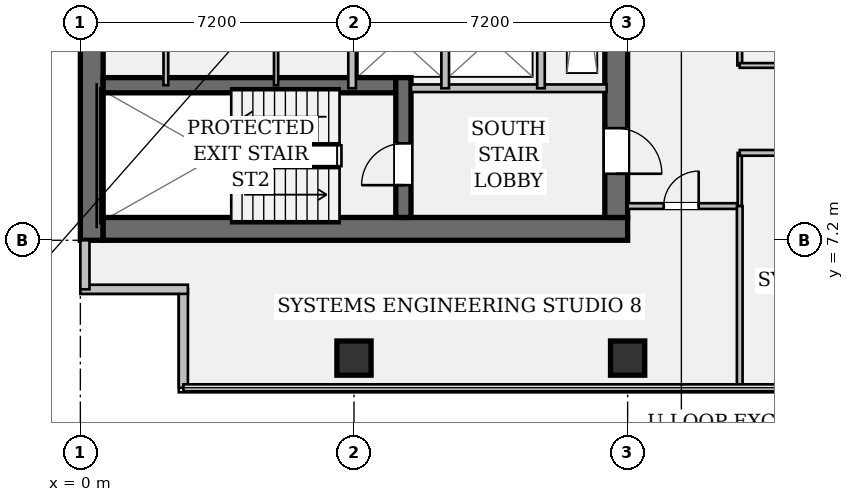
"""IFC4 building model, lengths in metres.
Left out: names, types, materials, properties, quantities, classifications, styles, units other than length and angle.
Written with IfcOpenShell. Run it as: python <this file> out.ifc"""

import sys

from ifc_helpers import new_model, si_unit, direction, frame, frame_2d, origin, origin_2d, place, context, subcontext, project, spatial, rectangle, hollow_rectangle, extrude, element, fill, save


model = new_model("IFC4")
c1 = context("Model", 3, precision=1e-05, world=origin(), true_north=direction((0.0, 1.0)))
c2 = subcontext(c1, "Body", "Model", "MODEL_VIEW")
j1 = project(units=[si_unit("LENGTHUNIT", "METRE"), si_unit("PLANEANGLEUNIT", "RADIAN")], contexts=[c1])
p1 = place(None, origin())
s1 = spatial("IfcSite", under=j1, at=p1, CompositionType="ELEMENT")
p2 = place(p1, origin())
s2 = spatial("IfcBuilding", under=s1, at=p2, CompositionType="ELEMENT")
p3 = place(p2, frame((0.0, 0.0, 140.7)))
s3 = spatial("IfcBuildingStorey", under=s2, at=p3, CompositionType="ELEMENT", Elevation=140.7)
p4 = place(p3, frame((0.3, 7.2, 0.0), z_axis=(0.0, 0.0, 1.0), x_axis=(0.0, 1.0, 0.0)))
e1 = element("IfcWall", 1, at=p4, inside=s3, PredefinedType="SHEAR", context=c2, shape_type="SweptSolid", body=[
    extrude(rectangle(XDim=28.8, YDim=0.6, at=frame_2d((14.4, 0.0))), origin(), (0.0, 0.0, 1.0), 3.58),
])
p5 = place(p3, frame((0.6, 7.5, 0.0), z_axis=(0.0, 0.0, 1.0), x_axis=(1.0, 0.0, 0.0)))
e2 = element("IfcWall", 2, at=p5, inside=s3, PredefinedType="SHEAR", context=c2, shape_type="SweptSolid", body=[
    extrude(rectangle(XDim=13.8, YDim=0.6, at=frame_2d((6.9, 0.0))), origin(), (0.0, 0.0, 1.0), 3.58),
])
p6 = place(p3, frame((14.1, 35.4, 0.0), z_axis=(0.0, 0.0, 1.0), x_axis=(0.0, -1.0, 0.0)))
e3 = element("IfcWall", 3, at=p6, inside=s3, PredefinedType="SHEAR", context=c2, shape_type="SweptSolid", body=[
    extrude(rectangle(XDim=27.6, YDim=0.6, at=frame_2d((13.8, 0.0))), origin(), (0.0, 0.0, 1.0), 3.58),
])
p7 = place(p6, frame((1.3, 0.0, 0.0)))
e4 = element("IfcOpeningElement", 4, at=p7, cuts=e3, PredefinedType="OPENING", context=c2, shape_type="SweptSolid", body=[
    extrude(rectangle(XDim=1.2, YDim=2.15, at=frame_2d((0.6, 1.075))), frame((0.0, 0.312, 0.0), z_axis=(0.0, -1.0, 0.0), x_axis=(1.0, 0.0, 0.0)), (0.0, 0.0, 1.0), 0.624),
])
p8 = place(p6, frame((25.25, 0.0, 0.0)))
e5 = element("IfcOpeningElement", 5, at=p8, cuts=e3, PredefinedType="OPENING", context=c2, shape_type="SweptSolid", body=[
    extrude(rectangle(XDim=1.2, YDim=2.15, at=frame_2d((0.6, 1.075))), frame((0.0, 0.312, 0.0), z_axis=(0.0, -1.0, 0.0), x_axis=(1.0, 0.0, 0.0)), (0.0, 0.0, 1.0), 0.624),
])
p9 = place(p6, frame((14.6, 0.0, 0.0)))
e6 = element("IfcOpeningElement", 6, at=p9, cuts=e3, PredefinedType="OPENING", context=c2, shape_type="SweptSolid", body=[
    extrude(rectangle(XDim=1.6, YDim=2.2, at=frame_2d((0.8, 1.1))), frame((0.0, 0.312, 0.0), z_axis=(0.0, -1.0, 0.0), x_axis=(1.0, 0.0, 0.0)), (0.0, 0.0, 1.0), 0.624),
])
p10 = place(p3, frame((0.6, 11.28, 0.0), z_axis=(0.0, 0.0, 1.0), x_axis=(1.0, 0.0, 0.0)))
e7 = element("IfcWall", 7, at=p10, inside=s3, PredefinedType="SHEAR", context=c2, shape_type="SweptSolid", body=[
    extrude(rectangle(XDim=7.7, YDim=0.4, at=frame_2d((3.85, 0.0))), origin(), (0.0, 0.0, 1.0), 3.58),
])
p11 = place(p3, frame((8.5, 7.8, 0.0), z_axis=(0.0, 0.0, 1.0), x_axis=(0.0, 1.0, 0.0)))
e8 = element("IfcWall", 8, at=p11, inside=s3, PredefinedType="SHEAR", context=c2, shape_type="SweptSolid", body=[
    extrude(rectangle(XDim=3.68, YDim=0.4, at=frame_2d((1.84, 0.0))), origin(), (0.0, 0.0, 1.0), 3.58),
])
p12 = place(p11, frame((0.85, 0.0, 0.0)))
e9 = element("IfcOpeningElement", 9, at=p12, cuts=e8, PredefinedType="OPENING", context=c2, shape_type="SweptSolid", body=[
    extrude(rectangle(XDim=1.1, YDim=2.15, at=frame_2d((0.55, 1.075))), frame((0.0, 0.212, 0.0), z_axis=(0.0, -1.0, 0.0), x_axis=(1.0, 0.0, 0.0)), (0.0, 0.0, 1.0), 0.424),
])
for number, where, z_axis, x_axis in (
    (10, (7.2, 4.1, 0.0), (0.0, 0.0, 1.0), (1.0, 0.0, 0.0)),
    (11, (14.4, 4.1, 0.0), (0.0, 0.0, 1.0), (1.0, 0.0, 0.0)),
):
    element("IfcColumn", number, at=place(p3, frame(where, z_axis=z_axis, x_axis=x_axis)), inside=s3, PredefinedType="COLUMN", context=c2, shape_type="SweptSolid", body=[
        extrude(hollow_rectangle(XDim=0.9, YDim=0.9, WallThickness=0.055, at=origin_2d()), origin(), (0.0, 0.0, 1.0), 3.58),
    ])
p13 = place(p3, frame((2.71, 3.32, 0.0), z_axis=(0.0, 0.0, 1.0), x_axis=(0.0, 1.0, 0.0)))
e12 = element("IfcWall", 12, at=p13, inside=s3, PredefinedType="STANDARD", context=c2, shape_type="SweptSolid", body=[
    extrude(rectangle(XDim=2.59, YDim=0.24, at=frame_2d((1.295, 0.0))), origin(), (0.0, 0.0, 1.0), 3.58),
])
p14 = place(p3, frame((2.83, 5.91, 0.0), z_axis=(0.0, 0.0, 1.0), x_axis=(-1.0, 0.0, 0.0)))
e13 = element("IfcWall", 13, at=p14, inside=s3, PredefinedType="STANDARD", context=c2, shape_type="SweptSolid", body=[
    extrude(rectangle(XDim=2.83, YDim=0.24, at=frame_2d((1.415, 0.0))), origin(), (0.0, 0.0, 1.0), 3.58),
])
p15 = place(p3, frame((0.12, 5.91, 0.0), z_axis=(0.0, 0.0, 1.0), x_axis=(0.0, 1.0, 0.0)))
e14 = element("IfcWall", 14, at=p15, inside=s3, PredefinedType="STANDARD", context=c2, shape_type="SweptSolid", body=[
    extrude(rectangle(XDim=1.29, YDim=0.24, at=frame_2d((0.645, 0.0))), origin(), (0.0, 0.0, 1.0), 3.58),
])
p16 = place(p3, frame((8.7, 11.2, 0.0), z_axis=(0.0, 0.0, 1.0), x_axis=(1.0, 0.0, 0.0)))
e15 = element("IfcWall", 15, at=p16, inside=s3, PredefinedType="PARTITIONING", context=c2, shape_type="SweptSolid", body=[
    extrude(rectangle(XDim=5.15, YDim=0.2, at=frame_2d((2.575, 0.0))), origin(), (0.0, 0.0, 1.0), 3.58),
])
for number, where, z_axis, x_axis in (
    (16, (7.15, 11.2, 0.0), (0.0, 0.0, 1.0), (0.0, 1.0, 0.0)),
    (17, (9.6, 11.2, 0.0), (0.0, 0.0, 1.0), (0.0, 1.0, 0.0)),
):
    element("IfcWall", number, at=place(p3, frame(where, z_axis=z_axis, x_axis=x_axis)), inside=s3, PredefinedType="PARTITIONING", context=c2, shape_type="SweptSolid", body=[
        extrude(rectangle(XDim=2.4, YDim=0.2, at=frame_2d((1.2, 0.0))), origin(), (0.0, 0.0, 1.0), 3.58),
    ])
p17 = place(p3, frame((12.12, 11.2, 0.0), z_axis=(0.0, 0.0, 1.0), x_axis=(0.0, 1.0, 0.0)))
e18 = element("IfcWall", 18, at=p17, inside=s3, PredefinedType="PARTITIONING", context=c2, shape_type="SweptSolid", body=[
    extrude(rectangle(XDim=6.6, YDim=0.2, at=frame_2d((3.3, 0.0))), origin(), (0.0, 0.0, 1.0), 3.58),
])
p18 = place(p17, frame((2.95, 0.0, 0.0)))
e19 = element("IfcOpeningElement", 19, at=p18, cuts=e18, PredefinedType="OPENING", context=c2, shape_type="SweptSolid", body=[
    extrude(rectangle(XDim=0.85, YDim=2.15, at=frame_2d((0.425, 1.075))), frame((0.0, 0.112, 0.0), z_axis=(0.0, -1.0, 0.0), x_axis=(1.0, 0.0, 0.0)), (0.0, 0.0, 1.0), 0.224),
])
p19 = place(p3, frame((5.15, 11.28, 0.0), z_axis=(0.0, 0.0, 1.0), x_axis=(0.0, 1.0, 0.0)))
e20 = element("IfcWall", 20, at=p19, inside=s3, PredefinedType="PARTITIONING", context=c2, shape_type="SweptSolid", body=[
    extrude(rectangle(XDim=4.42, YDim=0.11, at=frame_2d((2.21, 0.0))), origin(), (0.0, 0.0, 1.0), 3.58),
])
p20 = place(p3, frame((2.25, 11.28, 0.0), z_axis=(0.0, 0.0, 1.0), x_axis=(0.0, 1.0, 0.0)))
e21 = element("IfcWall", 21, at=p20, inside=s3, PredefinedType="PARTITIONING", context=c2, shape_type="SweptSolid", body=[
    extrude(rectangle(XDim=4.42, YDim=0.125, at=frame_2d((2.21, 0.0))), origin(), (0.0, 0.0, 1.0), 3.58),
])
p21 = place(p20, frame((1.65, 0.0, 0.0)))
e22 = element("IfcOpeningElement", 22, at=p21, cuts=e21, PredefinedType="OPENING", context=c2, shape_type="SweptSolid", body=[
    extrude(rectangle(XDim=0.85, YDim=2.15, at=frame_2d((0.425, 1.075))), frame((0.0, 0.074, 0.0), z_axis=(0.0, -1.0, 0.0), x_axis=(1.0, 0.0, 0.0)), (0.0, 0.0, 1.0), 0.149),
])
p22 = place(p3, frame((14.4, 8.1, 0.0), z_axis=(0.0, 0.0, 1.0), x_axis=(1.0, 0.0, 0.0)))
e23 = element("IfcWall", 23, at=p22, inside=s3, PredefinedType="PARTITIONING", context=c2, shape_type="SweptSolid", body=[
    extrude(rectangle(XDim=2.95, YDim=0.15, at=frame_2d((1.475, 0.0))), origin(), (0.0, 0.0, 1.0), 3.148),
])
p23 = place(p22, frame((0.95, 0.0, 0.0)))
e24 = element("IfcOpeningElement", 24, at=p23, cuts=e23, PredefinedType="OPENING", context=c2, shape_type="SweptSolid", body=[
    extrude(rectangle(XDim=0.92, YDim=2.15, at=frame_2d((0.46, 1.075))), frame((0.0, 0.087, 0.0), z_axis=(0.0, -1.0, 0.0), x_axis=(1.0, 0.0, 0.0)), (0.0, 0.0, 1.0), 0.174),
])
p24 = place(p3, frame((17.35, 8.1, 0.0), z_axis=(0.0, 0.0, 1.0), x_axis=(0.0, 1.0, 0.0)))
e25 = element("IfcWall", 25, at=p24, inside=s3, PredefinedType="PARTITIONING", context=c2, shape_type="SweptSolid", body=[
    extrude(rectangle(XDim=1.4, YDim=0.11, at=frame_2d((0.7, 0.0))), origin(), (0.0, 0.0, 1.0), 3.58),
])
p25 = place(p3, frame((17.35, 9.5, 0.0), z_axis=(0.0, 0.0, 1.0), x_axis=(1.0, 0.0, 0.0)))
e26 = element("IfcWall", 26, at=p25, inside=s3, PredefinedType="PARTITIONING", context=c2, shape_type="SweptSolid", body=[
    extrude(rectangle(XDim=15.75, YDim=0.15, at=frame_2d((7.875, 0.0))), origin(), (0.0, 0.0, 1.0), 2.869),
])
p26 = place(p25, frame((3.73, 0.0, 0.0)))
e27 = element("IfcOpeningElement", 27, at=p26, cuts=e26, PredefinedType="OPENING", context=c2, shape_type="SweptSolid", body=[
    extrude(rectangle(XDim=0.92, YDim=2.15, at=frame_2d((0.46, 1.075))), frame((0.0, 0.087, 0.0), z_axis=(0.0, -1.0, 0.0), x_axis=(1.0, 0.0, 0.0)), (0.0, 0.0, 1.0), 0.174),
])
p27 = place(p25, frame((11.6, 0.0, 0.0)))
e28 = element("IfcOpeningElement", 28, at=p27, cuts=e26, PredefinedType="OPENING", context=c2, shape_type="SweptSolid", body=[
    extrude(rectangle(XDim=0.92, YDim=2.15, at=frame_2d((0.46, 1.075))), frame((0.0, 0.087, 0.0), z_axis=(0.0, -1.0, 0.0), x_axis=(1.0, 0.0, 0.0)), (0.0, 0.0, 1.0), 0.174),
])
p28 = place(p3, frame((17.35, 11.8, 0.0), z_axis=(0.0, 0.0, 1.0), x_axis=(0.0, 1.0, 0.0)))
e29 = element("IfcWall", 29, at=p28, inside=s3, PredefinedType="PARTITIONING", context=c2, shape_type="SweptSolid", body=[
    extrude(rectangle(XDim=6.55, YDim=0.125, at=frame_2d((3.275, 0.0))), origin(), (0.0, 0.0, 1.0), 2.869),
])
p29 = place(p3, frame((17.35, 11.8, 0.0), z_axis=(0.0, 0.0, 1.0), x_axis=(1.0, 0.0, 0.0)))
e30 = element("IfcWall", 30, at=p29, inside=s3, PredefinedType="PARTITIONING", context=c2, shape_type="SweptSolid", body=[
    extrude(rectangle(XDim=13.4, YDim=0.125, at=frame_2d((6.7, 0.0))), origin(), (0.0, 0.0, 1.0), 2.869),
])
p30 = place(p3, frame((17.35, 3.32, 0.0), z_axis=(0.0, 0.0, 1.0), x_axis=(0.0, 1.0, 0.0)))
e31 = element("IfcWall", 31, at=p30, inside=s3, PredefinedType="PARTITIONING", context=c2, shape_type="SweptSolid", body=[
    extrude(rectangle(XDim=4.78, YDim=0.15, at=frame_2d((2.39, 0.0))), origin(), (0.0, 0.0, 1.0), 2.869),
])
p31 = place(p12, origin())
e32 = element("IfcDoor", 32, at=p31, inside=s3, OperationType="SINGLE_SWING_LEFT", PredefinedType="DOOR", context=c2, shape_type="SweptSolid", body=[
    extrude(rectangle(XDim=1.1, YDim=2.15, at=frame_2d((0.55, 1.075))), frame((0.0, 0.025, 0.0), z_axis=(0.0, -1.0, 0.0), x_axis=(1.0, 0.0, 0.0)), (0.0, 0.0, 1.0), 0.05),
])
fill(e9, e32)
p32 = place(p8, origin())
e33 = element("IfcDoor", 33, at=p32, inside=s3, OperationType="SINGLE_SWING_RIGHT", PredefinedType="DOOR", context=c2, shape_type="SweptSolid", body=[
    extrude(rectangle(XDim=1.2, YDim=2.15, at=frame_2d((0.6, 1.075))), frame((0.0, 0.025, 0.0), z_axis=(0.0, -1.0, 0.0), x_axis=(1.0, 0.0, 0.0)), (0.0, 0.0, 1.0), 0.05),
])
fill(e5, e33)
p33 = place(p23, origin())
e34 = element("IfcDoor", 34, at=p33, inside=s3, OperationType="SINGLE_SWING_RIGHT", PredefinedType="DOOR", context=c2, shape_type="SweptSolid", body=[
    extrude(rectangle(XDim=0.92, YDim=2.15, at=frame_2d((0.46, 1.075))), frame((0.0, 0.025, 0.0), z_axis=(0.0, -1.0, 0.0), x_axis=(1.0, 0.0, 0.0)), (0.0, 0.0, 1.0), 0.05),
])
fill(e24, e34)
save(model, sys.argv[1])
